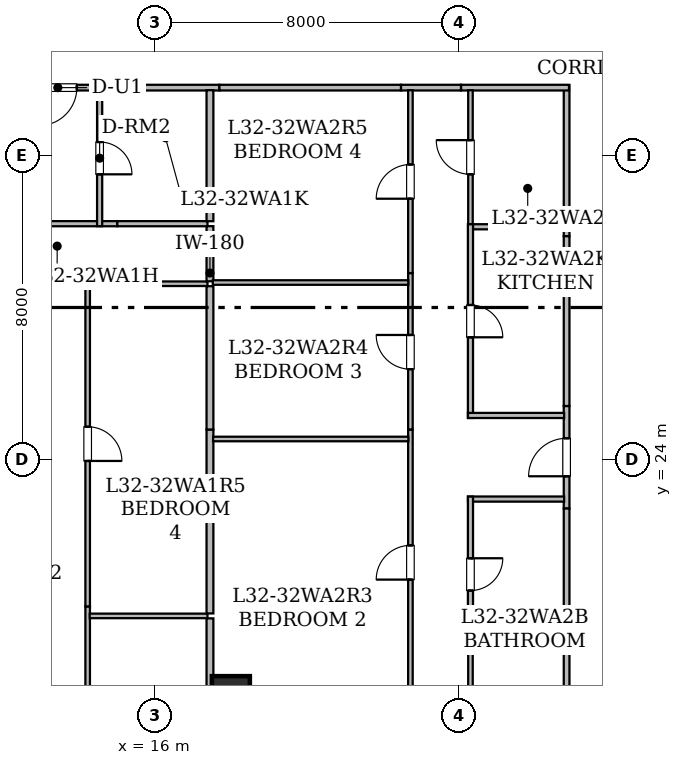
"""IFC4 building model, lengths in metres.
Left out: names, types, materials, properties, quantities, classifications, styles, units other than length and angle.
Written with IfcOpenShell. Run it as: python <this file> out.ifc"""

import sys

from ifc_helpers import new_model, si_unit, direction, frame, frame_2d, origin, origin_2d, place, context, subcontext, project, spatial, rectangle, hollow_rectangle, extrude, element, fill, save


model = new_model("IFC4")
c1 = context("Model", 3, precision=1e-05, world=origin(), true_north=direction((0.0, 1.0)))
c2 = subcontext(c1, "Body", "Model", "MODEL_VIEW")
j1 = project(units=[si_unit("LENGTHUNIT", "METRE"), si_unit("PLANEANGLEUNIT", "RADIAN")], contexts=[c1])
p1 = place(None, origin())
s1 = spatial("IfcSite", under=j1, at=p1, CompositionType="ELEMENT")
p2 = place(p1, origin())
s2 = spatial("IfcBuilding", under=s1, at=p2, CompositionType="ELEMENT")
p3 = place(p2, frame((0.0, 0.0, 127.45)))
s3 = spatial("IfcBuildingStorey", under=s2, at=p3, CompositionType="ELEMENT", Elevation=127.45)
p4 = place(p3, frame((18.0, 17.8, 0.0), z_axis=(0.0, 0.0, 1.0), x_axis=(1.0, 0.0, 0.0)))
e1 = element("IfcColumn", 1, at=p4, inside=s3, PredefinedType="COLUMN", context=c2, shape_type="SweptSolid", body=[
    extrude(hollow_rectangle(XDim=1.0, YDim=1.0, WallThickness=0.05, at=origin_2d()), origin(), (0.0, 0.0, 1.0), 3.65),
])
p5 = place(p3, frame((14.796, 33.785, 0.0), z_axis=(0.0, 0.0, 1.0), x_axis=(-1.0, 0.0, 0.0)))
e2 = element("IfcWall", 2, at=p5, inside=s3, PredefinedType="STANDARD", context=c2, shape_type="SweptSolid", body=[
    extrude(rectangle(XDim=2.698, YDim=0.15, at=frame_2d((1.349, 0.0))), origin(), (0.0, 0.0, 1.0), 2.876),
])
p6 = place(p5, frame((0.849, 0.0, 0.0)))
e3 = element("IfcOpeningElement", 3, at=p6, cuts=e2, PredefinedType="OPENING", context=c2, shape_type="SweptSolid", body=[
    extrude(rectangle(XDim=1.0, YDim=2.15, at=frame_2d((0.5, 1.075))), frame((0.0, 0.085, 0.0), z_axis=(0.0, -1.0, 0.0), x_axis=(1.0, 0.0, 0.0)), (0.0, 0.0, 1.0), 0.17),
])
p7 = place(p3, frame((17.699, 33.785, 0.0), z_axis=(0.0, 0.0, 1.0), x_axis=(-1.0, 0.0, 0.0)))
e4 = element("IfcWall", 4, at=p7, inside=s3, PredefinedType="STANDARD", context=c2, shape_type="SweptSolid", body=[
    extrude(rectangle(XDim=2.903, YDim=0.15, at=frame_2d((1.452, 0.0))), origin(), (0.0, 0.0, 1.0), 3.43),
])
p8 = place(p3, frame((26.835, 16.9, 0.0), z_axis=(0.0, 0.0, 1.0), x_axis=(0.0, 1.0, 0.0)))
e5 = element("IfcWall", 5, at=p8, inside=s3, PredefinedType="STANDARD", context=c2, shape_type="SweptSolid", body=[
    extrude(rectangle(XDim=2.343, YDim=0.15, at=frame_2d((1.171, 0.0))), origin(), (0.0, 0.0, 1.0), 2.647),
])
p9 = place(p3, frame((26.835, 29.875, 0.0), z_axis=(0.0, 0.0, 1.0), x_axis=(0.0, 1.0, 0.0)))
e6 = element("IfcWall", 6, at=p9, inside=s3, PredefinedType="STANDARD", context=c2, shape_type="SweptSolid", body=[
    extrude(rectangle(XDim=3.975, YDim=0.15, at=frame_2d((1.988, 0.0))), origin(), (0.0, 0.0, 1.0), 3.43),
])
p10 = place(p3, frame((26.898, 33.785, 0.0), z_axis=(0.0, 0.0, 1.0), x_axis=(-1.0, 0.0, 0.0)))
e7 = element("IfcWall", 7, at=p10, inside=s3, PredefinedType="STANDARD", context=c2, shape_type="SweptSolid", body=[
    extrude(rectangle(XDim=2.842, YDim=0.15, at=frame_2d((1.421, 0.0))), origin(), (0.0, 0.0, 1.0), 3.43),
])
p11 = place(p3, frame((26.835, 22.71, 0.0), z_axis=(0.0, 0.0, 1.0), x_axis=(0.0, 1.0, 0.0)))
e8 = element("IfcWall", 8, at=p11, inside=s3, PredefinedType="STANDARD", context=c2, shape_type="SweptSolid", body=[
    extrude(rectangle(XDim=2.698, YDim=0.15, at=frame_2d((1.349, 0.0))), origin(), (0.0, 0.0, 1.0), 3.43),
])
p12 = place(p11, frame((0.849, 0.0, 0.0)))
e9 = element("IfcOpeningElement", 9, at=p12, cuts=e8, PredefinedType="OPENING", context=c2, shape_type="SweptSolid", body=[
    extrude(rectangle(XDim=1.0, YDim=2.15, at=frame_2d((0.5, 1.075))), frame((0.0, 0.085, 0.0), z_axis=(0.0, -1.0, 0.0), x_axis=(1.0, 0.0, 0.0)), (0.0, 0.0, 1.0), 0.17),
])
p13 = place(p3, frame((24.056, 33.785, 0.0), z_axis=(0.0, 0.0, 1.0), x_axis=(-1.0, 0.0, 0.0)))
e10 = element("IfcWall", 10, at=p13, inside=s3, PredefinedType="STANDARD", context=c2, shape_type="SweptSolid", body=[
    extrude(rectangle(XDim=1.58, YDim=0.15, at=frame_2d((0.79, 0.0))), origin(), (0.0, 0.0, 1.0), 3.43),
])
p14 = place(p3, frame((26.835, 19.243, 0.0), z_axis=(0.0, 0.0, 1.0), x_axis=(0.0, 1.0, 0.0)))
e11 = element("IfcWall", 11, at=p14, inside=s3, PredefinedType="STANDARD", context=c2, shape_type="SweptSolid", body=[
    extrude(rectangle(XDim=3.467, YDim=0.15, at=frame_2d((1.733, 0.0))), origin(), (0.0, 0.0, 1.0), 3.43),
])
p15 = place(p3, frame((26.835, 25.408, 0.0), z_axis=(0.0, 0.0, 1.0), x_axis=(0.0, 1.0, 0.0)))
e12 = element("IfcWall", 12, at=p15, inside=s3, PredefinedType="STANDARD", context=c2, shape_type="SweptSolid", body=[
    extrude(rectangle(XDim=4.467, YDim=0.15, at=frame_2d((2.233, 0.0))), origin(), (0.0, 0.0, 1.0), 3.107),
])
p16 = place(p3, frame((22.476, 33.785, 0.0), z_axis=(0.0, 0.0, 1.0), x_axis=(-1.0, 0.0, 0.0)))
e13 = element("IfcWall", 13, at=p16, inside=s3, PredefinedType="STANDARD", context=c2, shape_type="SweptSolid", body=[
    extrude(rectangle(XDim=4.777, YDim=0.15, at=frame_2d((2.389, 0.0))), origin(), (0.0, 0.0, 1.0), 2.647),
])
p17 = place(p3, frame((10.396, 30.205, 0.0), z_axis=(0.0, 0.0, 1.0), x_axis=(1.0, 0.0, 0.0)))
e14 = element("IfcWall", 14, at=p17, inside=s3, PredefinedType="PARTITIONING", context=c2, shape_type="SweptSolid", body=[
    extrude(rectangle(XDim=4.616, YDim=0.135, at=frame_2d((2.308, 0.0))), origin(), (0.0, 0.0, 1.0), 2.876),
])
p18 = place(p17, frame((0.654, 0.0, 0.0)))
e15 = element("IfcOpeningElement", 15, at=p18, cuts=e14, PredefinedType="OPENING", context=c2, shape_type="SweptSolid", body=[
    extrude(rectangle(XDim=0.85, YDim=2.1, at=frame_2d((0.425, 1.05))), frame((0.0, 0.077, 0.0), z_axis=(0.0, -1.0, 0.0), x_axis=(1.0, 0.0, 0.0)), (0.0, 0.0, 1.0), 0.155),
])
p19 = place(p3, frame((14.547, 33.718, 0.0), z_axis=(0.0, 0.0, 1.0), x_axis=(0.0, -1.0, 0.0)))
e16 = element("IfcWall", 16, at=p19, inside=s3, PredefinedType="PARTITIONING", context=c2, shape_type="SweptSolid", body=[
    extrude(rectangle(XDim=3.578, YDim=0.135, at=frame_2d((1.789, 0.0))), origin(), (0.0, 0.0, 1.0), 3.43),
])
p20 = place(p19, frame((1.364, 0.0, 0.0)))
e17 = element("IfcOpeningElement", 17, at=p20, cuts=e16, PredefinedType="OPENING", context=c2, shape_type="SweptSolid", body=[
    extrude(rectangle(XDim=0.85, YDim=2.1, at=frame_2d((0.425, 1.05))), frame((0.0, 0.077, 0.0), z_axis=(0.0, -1.0, 0.0), x_axis=(1.0, 0.0, 0.0)), (0.0, 0.0, 1.0), 0.155),
])
p21 = place(p3, frame((15.012, 30.205, 0.0), z_axis=(0.0, 0.0, 1.0), x_axis=(1.0, 0.0, 0.0)))
e18 = element("IfcWall", 18, at=p21, inside=s3, PredefinedType="PARTITIONING", context=c2, shape_type="SweptSolid", body=[
    extrude(rectangle(XDim=2.373, YDim=0.135, at=frame_2d((1.187, 0.0))), origin(), (0.0, 0.0, 1.0), 3.43),
])
p22 = place(p3, frame((15.327, 28.625, 0.0), z_axis=(0.0, 0.0, 1.0), x_axis=(-1.0, 0.0, 0.0)))
e19 = element("IfcWall", 19, at=p22, inside=s3, PredefinedType="PARTITIONING", context=c2, shape_type="SweptSolid", body=[
    extrude(rectangle(XDim=3.845, YDim=0.12, at=frame_2d((1.922, 0.0))), origin(), (0.0, 0.0, 1.0), 2.876),
])
p23 = place(p3, frame((14.232, 20.134, 0.0), z_axis=(0.0, 0.0, 1.0), x_axis=(0.0, -1.0, 0.0)))
e20 = element("IfcWall", 20, at=p23, inside=s3, PredefinedType="PARTITIONING", context=c2, shape_type="SweptSolid", body=[
    extrude(rectangle(XDim=7.35, YDim=0.12, at=frame_2d((3.675, 0.0))), origin(), (0.0, 0.0, 1.0), 2.647),
])
p24 = place(p23, frame((3.246, 0.0, 0.0)))
e21 = element("IfcOpeningElement", 21, at=p24, cuts=e20, PredefinedType="OPENING", context=c2, shape_type="SweptSolid", body=[
    extrude(rectangle(XDim=0.9, YDim=2.1, at=frame_2d((0.45, 1.05))), frame((0.0, 0.07, 0.0), z_axis=(0.0, -1.0, 0.0), x_axis=(1.0, 0.0, 0.0)), (0.0, 0.0, 1.0), 0.14),
])
p25 = place(p3, frame((17.385, 28.625, 0.0), z_axis=(0.0, 0.0, 1.0), x_axis=(-1.0, 0.0, 0.0)))
e22 = element("IfcWall", 22, at=p25, inside=s3, PredefinedType="PARTITIONING", context=c2, shape_type="SweptSolid", body=[
    extrude(rectangle(XDim=2.058, YDim=0.12, at=frame_2d((1.029, 0.0))), origin(), (0.0, 0.0, 1.0), 3.43),
])
p26 = place(p3, frame((14.232, 28.69, 0.0), z_axis=(0.0, 0.0, 1.0), x_axis=(0.0, -1.0, 0.0)))
e23 = element("IfcWall", 23, at=p26, inside=s3, PredefinedType="PARTITIONING", context=c2, shape_type="SweptSolid", body=[
    extrude(rectangle(XDim=8.556, YDim=0.12, at=frame_2d((4.278, 0.0))), origin(), (0.0, 0.0, 1.0), 3.43),
])
p27 = place(p26, frame((3.828, 0.0, 0.0)))
e24 = element("IfcOpeningElement", 24, at=p27, cuts=e23, PredefinedType="OPENING", context=c2, shape_type="SweptSolid", body=[
    extrude(rectangle(XDim=0.9, YDim=2.1, at=frame_2d((0.45, 1.05))), frame((0.0, 0.07, 0.0), z_axis=(0.0, -1.0, 0.0), x_axis=(1.0, 0.0, 0.0)), (0.0, 0.0, 1.0), 0.14),
])
p28 = place(p3, frame((17.45, 30.14, 0.0), z_axis=(0.0, 0.0, 1.0), x_axis=(0.0, -1.0, 0.0)))
e25 = element("IfcWall", 25, at=p28, inside=s3, PredefinedType="STANDARD", context=c2, shape_type="SweptSolid", body=[
    extrude(rectangle(XDim=1.45, YDim=0.18, at=frame_2d((0.725, 0.0))), origin(), (0.0, 0.0, 1.0), 3.43),
])
p29 = place(p3, frame((17.45, 33.718, 0.0), z_axis=(0.0, 0.0, 1.0), x_axis=(0.0, -1.0, 0.0)))
e26 = element("IfcWall", 26, at=p29, inside=s3, PredefinedType="STANDARD", context=c2, shape_type="SweptSolid", body=[
    extrude(rectangle(XDim=3.448, YDim=0.18, at=frame_2d((1.724, 0.0))), origin(), (0.0, 0.0, 1.0), 3.43),
])
p30 = place(p3, frame((14.286, 19.885, 0.0), z_axis=(0.0, 0.0, 1.0), x_axis=(1.0, 0.0, 0.0)))
e27 = element("IfcWall", 27, at=p30, inside=s3, PredefinedType="PARTITIONING", context=c2, shape_type="SweptSolid", body=[
    extrude(rectangle(XDim=3.099, YDim=0.12, at=frame_2d((1.55, 0.0))), origin(), (0.0, 0.0, 1.0), 3.43),
])
p31 = place(p3, frame((17.45, 19.82, 0.0), z_axis=(0.0, 0.0, 1.0), x_axis=(0.0, -1.0, 0.0)))
e28 = element("IfcWall", 28, at=p31, inside=s3, PredefinedType="STANDARD", context=c2, shape_type="SweptSolid", body=[
    extrude(rectangle(XDim=1.987, YDim=0.18, at=frame_2d((0.994, 0.0))), origin(), (0.0, 0.0, 1.0), 2.647),
])
p32 = place(p3, frame((17.45, 24.789, 0.0), z_axis=(0.0, 0.0, 1.0), x_axis=(0.0, -1.0, 0.0)))
e29 = element("IfcWall", 29, at=p32, inside=s3, PredefinedType="STANDARD", context=c2, shape_type="SweptSolid", body=[
    extrude(rectangle(XDim=4.839, YDim=0.18, at=frame_2d((2.419, 0.0))), origin(), (0.0, 0.0, 1.0), 3.43),
])
p33 = place(p3, frame((17.45, 28.56, 0.0), z_axis=(0.0, 0.0, 1.0), x_axis=(0.0, -1.0, 0.0)))
e30 = element("IfcWall", 30, at=p33, inside=s3, PredefinedType="STANDARD", context=c2, shape_type="SweptSolid", body=[
    extrude(rectangle(XDim=3.771, YDim=0.18, at=frame_2d((1.885, 0.0))), origin(), (0.0, 0.0, 1.0), 3.43),
])
p34 = place(p3, frame((24.305, 6.612, 0.0), z_axis=(0.0, 0.0, 1.0), x_axis=(0.0, 1.0, 0.0)))
e31 = element("IfcWall", 31, at=p34, inside=s3, PredefinedType="PARTITIONING", context=c2, shape_type="SweptSolid", body=[
    extrude(rectangle(XDim=12.317, YDim=0.12, at=frame_2d((6.158, 0.0))), origin(), (0.0, 0.0, 1.0), 2.647),
])
p35 = place(p34, frame((5.708, 0.0, 0.0)))
e32 = element("IfcOpeningElement", 32, at=p35, cuts=e31, PredefinedType="OPENING", context=c2, shape_type="SweptSolid", body=[
    extrude(rectangle(XDim=0.9, YDim=2.1, at=frame_2d((0.45, 1.05))), frame((0.0, 0.07, 0.0), z_axis=(0.0, -1.0, 0.0), x_axis=(1.0, 0.0, 0.0)), (0.0, 0.0, 1.0), 0.14),
])
p36 = place(p3, frame((24.37, 18.994, 0.0), z_axis=(0.0, 0.0, 1.0), x_axis=(1.0, 0.0, 0.0)))
e33 = element("IfcWall", 33, at=p36, inside=s3, PredefinedType="PARTITIONING", context=c2, shape_type="SweptSolid", body=[
    extrude(rectangle(XDim=2.4, YDim=0.135, at=frame_2d((1.2, 0.0))), origin(), (0.0, 0.0, 1.0), 2.647),
])
p37 = place(p3, frame((24.305, 30.189, 0.0), z_axis=(0.0, 0.0, 1.0), x_axis=(0.0, 1.0, 0.0)))
e34 = element("IfcWall", 34, at=p37, inside=s3, PredefinedType="PARTITIONING", context=c2, shape_type="SweptSolid", body=[
    extrude(rectangle(XDim=3.529, YDim=0.12, at=frame_2d((1.765, 0.0))), origin(), (0.0, 0.0, 1.0), 3.43),
])
p38 = place(p37, frame((1.315, 0.0, 0.0)))
e35 = element("IfcOpeningElement", 35, at=p38, cuts=e34, PredefinedType="OPENING", context=c2, shape_type="SweptSolid", body=[
    extrude(rectangle(XDim=0.9, YDim=2.1, at=frame_2d((0.45, 1.05))), frame((0.0, 0.07, 0.0), z_axis=(0.0, -1.0, 0.0), x_axis=(1.0, 0.0, 0.0)), (0.0, 0.0, 1.0), 0.14),
])
p39 = place(p3, frame((26.77, 30.124, 0.0), z_axis=(0.0, 0.0, 1.0), x_axis=(-1.0, 0.0, 0.0)))
e36 = element("IfcWall", 36, at=p39, inside=s3, PredefinedType="PARTITIONING", context=c2, shape_type="SweptSolid", body=[
    extrude(rectangle(XDim=2.4, YDim=0.135, at=frame_2d((1.2, 0.0))), origin(), (0.0, 0.0, 1.0), 3.43),
])
p40 = place(p3, frame((26.77, 22.959, 0.0), z_axis=(0.0, 0.0, 1.0), x_axis=(-1.0, 0.0, 0.0)))
e37 = element("IfcWall", 37, at=p40, inside=s3, PredefinedType="PARTITIONING", context=c2, shape_type="SweptSolid", body=[
    extrude(rectangle(XDim=2.53, YDim=0.135, at=frame_2d((1.265, 0.0))), origin(), (0.0, 0.0, 1.0), 3.43),
])
p41 = place(p3, frame((24.305, 23.024, 0.0), z_axis=(0.0, 0.0, 1.0), x_axis=(0.0, -1.0, 0.0)))
e38 = element("IfcWall", 38, at=p41, inside=s3, PredefinedType="PARTITIONING", context=c2, shape_type="SweptSolid", body=[
    extrude(rectangle(XDim=4.095, YDim=0.135, at=frame_2d((2.047, 0.0))), origin(), (0.0, 0.0, 1.0), 3.43),
])
p42 = place(p41, frame((1.622, 0.0, 0.0)))
e39 = element("IfcOpeningElement", 39, at=p42, cuts=e38, PredefinedType="OPENING", context=c2, shape_type="SweptSolid", body=[
    extrude(rectangle(XDim=0.85, YDim=2.1, at=frame_2d((0.425, 1.05))), frame((0.0, 0.077, 0.0), z_axis=(0.0, -1.0, 0.0), x_axis=(1.0, 0.0, 0.0)), (0.0, 0.0, 1.0), 0.155),
])
p43 = place(p3, frame((24.305, 30.189, 0.0), z_axis=(0.0, 0.0, 1.0), x_axis=(0.0, -1.0, 0.0)))
e40 = element("IfcWall", 40, at=p43, inside=s3, PredefinedType="PARTITIONING", context=c2, shape_type="SweptSolid", body=[
    extrude(rectangle(XDim=5.095, YDim=0.135, at=frame_2d((2.547, 0.0))), origin(), (0.0, 0.0, 1.0), 3.107),
])
p44 = place(p43, frame((2.123, 0.0, 0.0)))
e41 = element("IfcOpeningElement", 41, at=p44, cuts=e40, PredefinedType="OPENING", context=c2, shape_type="SweptSolid", body=[
    extrude(rectangle(XDim=0.85, YDim=2.1, at=frame_2d((0.425, 1.05))), frame((0.0, 0.077, 0.0), z_axis=(0.0, -1.0, 0.0), x_axis=(1.0, 0.0, 0.0)), (0.0, 0.0, 1.0), 0.155),
])
p45 = place(p3, frame((24.24, 25.159, 0.0), z_axis=(0.0, 0.0, 1.0), x_axis=(1.0, 0.0, 0.0)))
e42 = element("IfcWall", 42, at=p45, inside=s3, PredefinedType="PARTITIONING", context=c2, shape_type="SweptSolid", body=[
    extrude(rectangle(XDim=2.53, YDim=0.135, at=frame_2d((1.265, 0.0))), origin(), (0.0, 0.0, 1.0), 3.43),
])
p46 = place(p3, frame((22.725, 17.833, 0.0), z_axis=(0.0, 0.0, 1.0), x_axis=(0.0, 1.0, 0.0)))
e43 = element("IfcWall", 43, at=p46, inside=s3, PredefinedType="PARTITIONING", context=c2, shape_type="SweptSolid", body=[
    extrude(rectangle(XDim=6.956, YDim=0.12, at=frame_2d((3.478, 0.0))), origin(), (0.0, 0.0, 1.0), 2.647),
])
p47 = place(p46, frame((3.007, 0.0, 0.0)))
e44 = element("IfcOpeningElement", 44, at=p47, cuts=e43, PredefinedType="OPENING", context=c2, shape_type="SweptSolid", body=[
    extrude(rectangle(XDim=0.9, YDim=2.1, at=frame_2d((0.45, 1.05))), frame((0.0, 0.07, 0.0), z_axis=(0.0, -1.0, 0.0), x_axis=(1.0, 0.0, 0.0)), (0.0, 0.0, 1.0), 0.14),
])
p48 = place(p3, frame((22.725, 24.789, 0.0), z_axis=(0.0, 0.0, 1.0), x_axis=(0.0, 1.0, 0.0)))
e45 = element("IfcWall", 45, at=p48, inside=s3, PredefinedType="PARTITIONING", context=c2, shape_type="SweptSolid", body=[
    extrude(rectangle(XDim=4.117, YDim=0.12, at=frame_2d((2.059, 0.0))), origin(), (0.0, 0.0, 1.0), 3.107),
])
p49 = place(p48, frame((1.588, 0.0, 0.0)))
e46 = element("IfcOpeningElement", 46, at=p49, cuts=e45, PredefinedType="OPENING", context=c2, shape_type="SweptSolid", body=[
    extrude(rectangle(XDim=0.9, YDim=2.1, at=frame_2d((0.45, 1.05))), frame((0.0, 0.07, 0.0), z_axis=(0.0, -1.0, 0.0), x_axis=(1.0, 0.0, 0.0)), (0.0, 0.0, 1.0), 0.14),
])
p50 = place(p3, frame((22.725, 28.906, 0.0), z_axis=(0.0, 0.0, 1.0), x_axis=(0.0, 1.0, 0.0)))
e47 = element("IfcWall", 47, at=p50, inside=s3, PredefinedType="PARTITIONING", context=c2, shape_type="SweptSolid", body=[
    extrude(rectangle(XDim=4.812, YDim=0.12, at=frame_2d((2.406, 0.0))), origin(), (0.0, 0.0, 1.0), 3.43),
])
p51 = place(p50, frame((1.956, 0.0, 0.0)))
e48 = element("IfcOpeningElement", 48, at=p51, cuts=e47, PredefinedType="OPENING", context=c2, shape_type="SweptSolid", body=[
    extrude(rectangle(XDim=0.9, YDim=2.1, at=frame_2d((0.45, 1.05))), frame((0.0, 0.07, 0.0), z_axis=(0.0, -1.0, 0.0), x_axis=(1.0, 0.0, 0.0)), (0.0, 0.0, 1.0), 0.14),
])
p52 = place(p3, frame((17.532, 24.54, 0.0), z_axis=(0.0, 0.0, 1.0), x_axis=(1.0, 0.0, 0.0)))
e49 = element("IfcWall", 49, at=p52, inside=s3, PredefinedType="PARTITIONING", context=c2, shape_type="SweptSolid", body=[
    extrude(rectangle(XDim=5.139, YDim=0.12, at=frame_2d((2.569, 0.0))), origin(), (0.0, 0.0, 1.0), 2.647),
])
p53 = place(p3, frame((17.524, 28.657, 0.0), z_axis=(0.0, 0.0, 1.0), x_axis=(1.0, 0.0, 0.0)))
e50 = element("IfcWall", 50, at=p53, inside=s3, PredefinedType="PARTITIONING", context=c2, shape_type="SweptSolid", body=[
    extrude(rectangle(XDim=5.147, YDim=0.12, at=frame_2d((2.573, 0.0))), origin(), (0.0, 0.0, 1.0), 2.647),
])
p54 = place(p6, origin())
e51 = element("IfcDoor", 51, at=p54, inside=s3, OperationType="SINGLE_SWING_RIGHT", PredefinedType="DOOR", context=c2, shape_type="SweptSolid", body=[
    extrude(rectangle(XDim=1.0, YDim=2.15, at=frame_2d((0.5, 1.075))), frame((0.0, 0.025, 0.0), z_axis=(0.0, -1.0, 0.0), x_axis=(1.0, 0.0, 0.0)), (0.0, 0.0, 1.0), 0.05),
])
fill(e3, e51)
p55 = place(p12, origin())
e52 = element("IfcDoor", 52, at=p55, inside=s3, OperationType="SINGLE_SWING_LEFT", PredefinedType="DOOR", context=c2, shape_type="SweptSolid", body=[
    extrude(rectangle(XDim=1.0, YDim=2.15, at=frame_2d((0.5, 1.075))), frame((0.0, 0.025, 0.0), z_axis=(0.0, -1.0, 0.0), x_axis=(1.0, 0.0, 0.0)), (0.0, 0.0, 1.0), 0.05),
])
fill(e9, e52)
p56 = place(p20, origin())
e53 = element("IfcDoor", 53, at=p56, inside=s3, OperationType="SINGLE_SWING_RIGHT", PredefinedType="DOOR", context=c2, shape_type="SweptSolid", body=[
    extrude(rectangle(XDim=0.85, YDim=2.1, at=frame_2d((0.425, 1.05))), frame((0.0, 0.025, 0.0), z_axis=(0.0, -1.0, 0.0), x_axis=(1.0, 0.0, 0.0)), (0.0, 0.0, 1.0), 0.05),
])
fill(e17, e53)
p57 = place(p27, origin())
e54 = element("IfcDoor", 54, at=p57, inside=s3, OperationType="SINGLE_SWING_RIGHT", PredefinedType="DOOR", context=c2, shape_type="SweptSolid", body=[
    extrude(rectangle(XDim=0.9, YDim=2.1, at=frame_2d((0.45, 1.05))), frame((0.0, 0.025, 0.0), z_axis=(0.0, -1.0, 0.0), x_axis=(1.0, 0.0, 0.0)), (0.0, 0.0, 1.0), 0.05),
])
fill(e24, e54)
p58 = place(p38, origin())
e55 = element("IfcDoor", 55, at=p58, inside=s3, OperationType="SINGLE_SWING_RIGHT", PredefinedType="DOOR", context=c2, shape_type="SweptSolid", body=[
    extrude(rectangle(XDim=0.9, YDim=2.1, at=frame_2d((0.45, 1.05))), frame((0.0, 0.025, 0.0), z_axis=(0.0, -1.0, 0.0), x_axis=(1.0, 0.0, 0.0)), (0.0, 0.0, 1.0), 0.05),
])
fill(e35, e55)
p59 = place(p42, origin())
e56 = element("IfcDoor", 56, at=p59, inside=s3, OperationType="SINGLE_SWING_LEFT", PredefinedType="DOOR", context=c2, shape_type="SweptSolid", body=[
    extrude(rectangle(XDim=0.85, YDim=2.1, at=frame_2d((0.425, 1.05))), frame((0.0, 0.025, 0.0), z_axis=(0.0, -1.0, 0.0), x_axis=(1.0, 0.0, 0.0)), (0.0, 0.0, 1.0), 0.05),
])
fill(e39, e56)
p60 = place(p44, origin())
e57 = element("IfcDoor", 57, at=p60, inside=s3, OperationType="SINGLE_SWING_RIGHT", PredefinedType="DOOR", context=c2, shape_type="SweptSolid", body=[
    extrude(rectangle(XDim=0.85, YDim=2.1, at=frame_2d((0.425, 1.05))), frame((0.0, 0.025, 0.0), z_axis=(0.0, -1.0, 0.0), x_axis=(1.0, 0.0, 0.0)), (0.0, 0.0, 1.0), 0.05),
])
fill(e41, e57)
p61 = place(p47, origin())
e58 = element("IfcDoor", 58, at=p61, inside=s3, OperationType="SINGLE_SWING_LEFT", PredefinedType="DOOR", context=c2, shape_type="SweptSolid", body=[
    extrude(rectangle(XDim=0.9, YDim=2.1, at=frame_2d((0.45, 1.05))), frame((0.0, 0.025, 0.0), z_axis=(0.0, -1.0, 0.0), x_axis=(1.0, 0.0, 0.0)), (0.0, 0.0, 1.0), 0.05),
])
fill(e44, e58)
p62 = place(p49, origin())
e59 = element("IfcDoor", 59, at=p62, inside=s3, OperationType="SINGLE_SWING_RIGHT", PredefinedType="DOOR", context=c2, shape_type="SweptSolid", body=[
    extrude(rectangle(XDim=0.9, YDim=2.1, at=frame_2d((0.45, 1.05))), frame((0.0, 0.025, 0.0), z_axis=(0.0, -1.0, 0.0), x_axis=(1.0, 0.0, 0.0)), (0.0, 0.0, 1.0), 0.05),
])
fill(e46, e59)
p63 = place(p51, origin())
e60 = element("IfcDoor", 60, at=p63, inside=s3, OperationType="SINGLE_SWING_LEFT", PredefinedType="DOOR", context=c2, shape_type="SweptSolid", body=[
    extrude(rectangle(XDim=0.9, YDim=2.1, at=frame_2d((0.45, 1.05))), frame((0.0, 0.025, 0.0), z_axis=(0.0, -1.0, 0.0), x_axis=(1.0, 0.0, 0.0)), (0.0, 0.0, 1.0), 0.05),
])
fill(e48, e60)
save(model, sys.argv[1])
